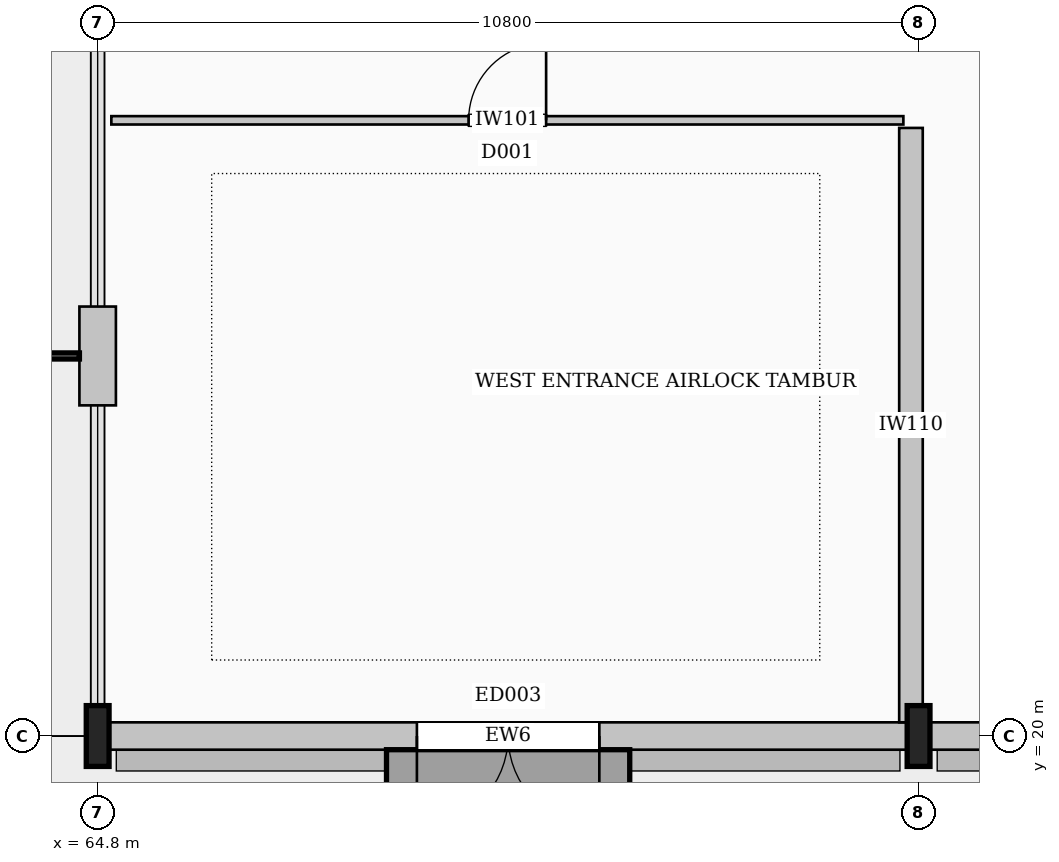
"""IFC4 building model, lengths in metres.
Left out: names, types, materials, properties, quantities, classifications, styles, units other than length and angle.
Written with IfcOpenShell. Run it as: python <this file> out.ifc"""

import sys

from ifc_helpers import new_model, si_unit, direction, frame, frame_2d, origin, origin_2d, place, context, subcontext, project, spatial, rectangle, i_section, extrude, element, fill, save


model = new_model("IFC4")
c1 = context("Model", 3, precision=1e-05, world=origin(), true_north=direction((0.0, 1.0)))
c2 = subcontext(c1, "Body", "Model", "MODEL_VIEW")
j1 = project(units=[si_unit("LENGTHUNIT", "METRE"), si_unit("PLANEANGLEUNIT", "RADIAN")], contexts=[c1])
p1 = place(None, origin())
s1 = spatial("IfcSite", under=j1, at=p1, CompositionType="ELEMENT")
p2 = place(p1, origin())
s2 = spatial("IfcBuilding", under=s1, at=p2, CompositionType="ELEMENT")
p3 = place(p2, origin())
s3 = spatial("IfcBuildingStorey", under=s2, at=p3, CompositionType="ELEMENT", Elevation=0.0)
for number, where, z_axis, x_axis in (
    (1, (64.8, 20.0, 0.0), (0.0, 0.0, 1.0), (1.0, 0.0, 0.0)),
    (2, (75.6, 20.0, 0.0), (0.0, 0.0, 1.0), (1.0, 0.0, 0.0)),
):
    element("IfcColumn", number, at=place(p3, frame(where, z_axis=z_axis, x_axis=x_axis)), inside=s3, PredefinedType="COLUMN", context=c2, shape_type="SweptSolid", body=[
        extrude(i_section(OverallWidth=0.3, OverallDepth=0.8, WebThickness=0.018, FlangeThickness=0.033, FilletRadius=0.03, at=origin_2d()), origin(), (0.0, 0.0, 1.0), 4.8),
    ])
p4 = place(p3, frame((64.8, 25.65, 0.0), z_axis=(0.0, 0.0, 1.0), x_axis=(0.0, -1.0, 0.0)))
e3 = element("IfcWall", 3, at=p4, inside=s3, PredefinedType="STANDARD", context=c2, shape_type="SweptSolid", body=[
    extrude(rectangle(XDim=1.3, YDim=0.48, at=frame_2d((0.65, 0.0))), origin(), (0.0, 0.0, 1.0), 4.56),
])
p5 = place(p3, frame((64.8, 20.37, 0.0), z_axis=(0.0, 0.0, 1.0), x_axis=(0.0, -1.0, 0.0)))
e4 = element("IfcWall", 4, at=p5, inside=s3, PredefinedType="STANDARD", context=c2, shape_type="SweptSolid", body=[
    extrude(rectangle(XDim=0.225, YDim=0.3, at=frame_2d((0.113, 0.0))), origin(), (0.0, 0.0, 1.0), 4.56),
])
p6 = place(p3, frame((64.945, 20.0, 0.0), z_axis=(0.0, 0.0, 1.0), x_axis=(1.0, 0.0, 0.0)))
e5 = element("IfcWall", 5, at=p6, inside=s3, PredefinedType="STANDARD", context=c2, shape_type="SweptSolid", body=[
    extrude(rectangle(XDim=10.51, YDim=0.36, at=frame_2d((5.255, 0.0))), origin(), (0.0, 0.0, 1.0), 4.36),
])
p7 = place(p6, frame((4.055, 0.0, 0.0)))
e6 = element("IfcOpeningElement", 6, at=p7, cuts=e5, PredefinedType="OPENING", context=c2, shape_type="SweptSolid", body=[
    extrude(rectangle(XDim=2.4, YDim=2.6, at=frame_2d((1.2, 1.3))), frame((0.0, 0.19, 0.0), z_axis=(0.0, -1.0, 0.0), x_axis=(1.0, 0.0, 0.0)), (0.0, 0.0, 1.0), 0.38),
])
p8 = place(p3, frame((75.745, 20.0, 0.0), z_axis=(0.0, 0.0, 1.0), x_axis=(1.0, 0.0, 0.0)))
e7 = element("IfcWall", 7, at=p8, inside=s3, PredefinedType="STANDARD", context=c2, shape_type="SweptSolid", body=[
    extrude(rectangle(XDim=10.51, YDim=0.36, at=frame_2d((5.255, 0.0))), origin(), (0.0, 0.0, 1.0), 4.36),
])
p9 = place(p8, frame((3.155, 0.0, 0.9)))
e8 = element("IfcOpeningElement", 8, at=p9, cuts=e7, PredefinedType="OPENING", context=c2, shape_type="SweptSolid", body=[
    extrude(rectangle(XDim=4.2, YDim=2.7, at=frame_2d((2.1, 1.35))), frame((0.0, 0.19, 0.0), z_axis=(0.0, -1.0, 0.0), x_axis=(1.0, 0.0, 0.0)), (0.0, 0.0, 1.0), 0.38),
])
p10 = place(p3, frame((64.98, 28.1, 0.0), z_axis=(0.0, 0.0, 1.0), x_axis=(1.0, 0.0, 0.0)))
e9 = element("IfcWall", 9, at=p10, inside=s3, PredefinedType="PARTITIONING", context=c2, shape_type="SweptSolid", body=[
    extrude(rectangle(XDim=10.42, YDim=0.11, at=frame_2d((5.21, 0.0))), origin(), (0.0, 0.0, 1.0), 4.52),
])
p11 = place(p10, frame((4.7, 0.0, 0.0)))
e10 = element("IfcOpeningElement", 10, at=p11, cuts=e9, PredefinedType="OPENING", context=c2, shape_type="SweptSolid", body=[
    extrude(rectangle(XDim=1.02, YDim=2.1, at=frame_2d((0.51, 1.05))), frame((0.0, 0.065, 0.0), z_axis=(0.0, -1.0, 0.0), x_axis=(1.0, 0.0, 0.0)), (0.0, 0.0, 1.0), 0.13),
])
p12 = place(p3, frame((75.5, 20.18, 0.0), z_axis=(0.0, 0.0, 1.0), x_axis=(0.0, 1.0, 0.0)))
e11 = element("IfcWall", 11, at=p12, inside=s3, PredefinedType="PARTITIONING", context=c2, shape_type="SweptSolid", body=[
    extrude(rectangle(XDim=7.82, YDim=0.31, at=frame_2d((3.91, 0.0))), origin(), (0.0, 0.0, 1.0), 4.52),
])
p13 = place(p7, frame((2.4, 0.0, 0.0), z_axis=(0.0, 0.0, 1.0), x_axis=(-1.0, 0.0, 0.0)))
e12 = element("IfcDoor", 12, at=p13, inside=s3, OperationType="DOUBLE_DOOR_SINGLE_SWING", PredefinedType="DOOR", context=c2, shape_type="SweptSolid", body=[
    extrude(rectangle(XDim=2.4, YDim=2.6, at=frame_2d((1.2, 1.3))), frame((0.0, 0.025, 0.0), z_axis=(0.0, -1.0, 0.0), x_axis=(1.0, 0.0, 0.0)), (0.0, 0.0, 1.0), 0.05),
])
fill(e6, e12)
p14 = place(p11, origin())
e13 = element("IfcDoor", 13, at=p14, inside=s3, OperationType="SINGLE_SWING_RIGHT", PredefinedType="DOOR", context=c2, shape_type="SweptSolid", body=[
    extrude(rectangle(XDim=1.02, YDim=2.1, at=frame_2d((0.51, 1.05))), frame((0.0, 0.025, 0.0), z_axis=(0.0, -1.0, 0.0), x_axis=(1.0, 0.0, 0.0)), (0.0, 0.0, 1.0), 0.05),
])
fill(e10, e13)
save(model, sys.argv[1])
